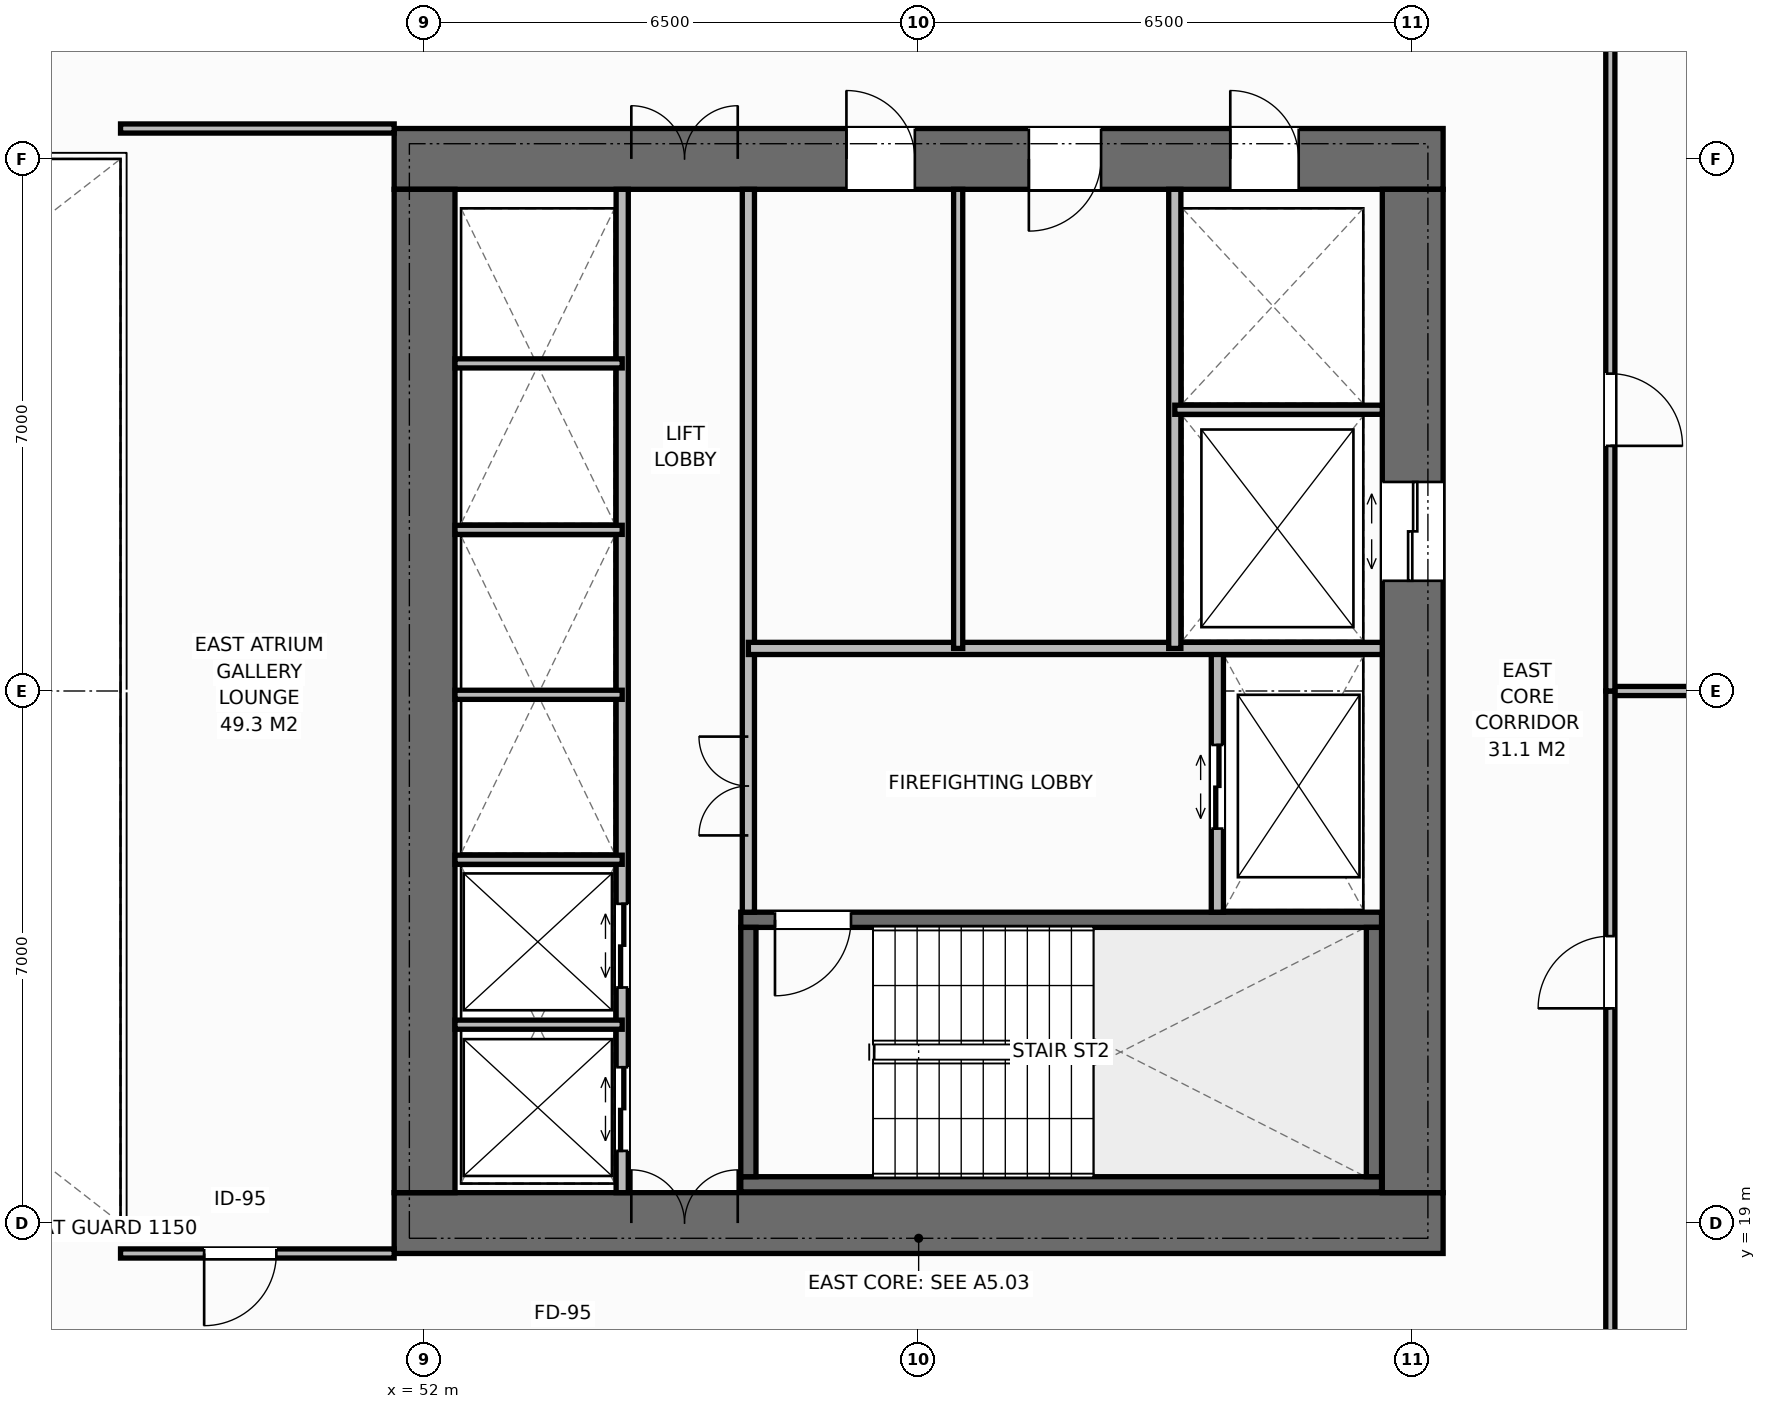
"""IFC4 building model, lengths in metres.
Left out: names, types, materials, properties, quantities, classifications, styles, units other than length and angle.
Written with IfcOpenShell. Run it as: python <this file> out.ifc"""

import sys

from ifc_helpers import new_model, si_unit, direction, frame, frame_2d, origin, place, context, subcontext, project, spatial, rectangle, extrude, element, fill, save


model = new_model("IFC4")
c1 = context("Model", 3, precision=1e-05, world=origin(), true_north=direction((0.0, 1.0)))
c2 = subcontext(c1, "Body", "Model", "MODEL_VIEW")
j1 = project(units=[si_unit("LENGTHUNIT", "METRE"), si_unit("PLANEANGLEUNIT", "RADIAN")], contexts=[c1])
p1 = place(None, origin())
s1 = spatial("IfcSite", under=j1, at=p1, CompositionType="ELEMENT")
p2 = place(p1, origin())
s2 = spatial("IfcBuilding", under=s1, at=p2, CompositionType="ELEMENT")
p3 = place(p2, frame((0.0, 0.0, 27.8)))
s3 = spatial("IfcBuildingStorey", under=s2, at=p3, CompositionType="ELEMENT", Elevation=27.8)
p4 = place(p3, frame((51.6, 19.0, 0.0), z_axis=(0.0, 0.0, 1.0), x_axis=(1.0, 0.0, 0.0)))
e1 = element("IfcWall", 1, at=p4, inside=s3, PredefinedType="SHEAR", context=c2, shape_type="SweptSolid", body=[
    extrude(rectangle(XDim=13.8, YDim=0.8, at=frame_2d((6.9, 0.0))), origin(), (0.0, 0.0, 1.0), 3.8),
])
p5 = place(p4, frame((3.12, 0.0, 0.0)))
e2 = element("IfcOpeningElement", 2, at=p5, cuts=e1, PredefinedType="OPENING", context=c2, shape_type="SweptSolid", body=[
    extrude(rectangle(XDim=1.4, YDim=2.2, at=frame_2d((0.7, 1.1))), frame((0.0, 0.41, 0.0), z_axis=(0.0, -1.0, 0.0), x_axis=(1.0, 0.0, 0.0)), (0.0, 0.0, 1.0), 0.82),
])
p6 = place(p3, frame((51.6, 33.0, 0.0), z_axis=(0.0, 0.0, 1.0), x_axis=(1.0, 0.0, 0.0)))
e3 = element("IfcWall", 3, at=p6, inside=s3, PredefinedType="SHEAR", context=c2, shape_type="SweptSolid", body=[
    extrude(rectangle(XDim=13.8, YDim=0.8, at=frame_2d((6.9, 0.0))), origin(), (0.0, 0.0, 1.0), 3.8),
])
p7 = place(p6, frame((3.12, 0.0, 0.0)))
e4 = element("IfcOpeningElement", 4, at=p7, cuts=e3, PredefinedType="OPENING", context=c2, shape_type="SweptSolid", body=[
    extrude(rectangle(XDim=1.4, YDim=2.2, at=frame_2d((0.7, 1.1))), frame((0.0, 0.41, 0.0), z_axis=(0.0, -1.0, 0.0), x_axis=(1.0, 0.0, 0.0)), (0.0, 0.0, 1.0), 0.82),
])
p8 = place(p6, frame((11.0, 0.0, 0.0)))
e5 = element("IfcOpeningElement", 5, at=p8, cuts=e3, PredefinedType="OPENING", context=c2, shape_type="SweptSolid", body=[
    extrude(rectangle(XDim=0.9, YDim=2.15, at=frame_2d((0.45, 1.075))), frame((0.0, 0.41, 0.0), z_axis=(0.0, -1.0, 0.0), x_axis=(1.0, 0.0, 0.0)), (0.0, 0.0, 1.0), 0.82),
])
p9 = place(p6, frame((5.95, 0.0, 0.0)))
e6 = element("IfcOpeningElement", 6, at=p9, cuts=e3, PredefinedType="OPENING", context=c2, shape_type="SweptSolid", body=[
    extrude(rectangle(XDim=0.9, YDim=2.15, at=frame_2d((0.45, 1.075))), frame((0.0, 0.41, 0.0), z_axis=(0.0, -1.0, 0.0), x_axis=(1.0, 0.0, 0.0)), (0.0, 0.0, 1.0), 0.82),
])
p10 = place(p6, frame((8.35, 0.0, 0.0)))
e7 = element("IfcOpeningElement", 7, at=p10, cuts=e3, PredefinedType="OPENING", context=c2, shape_type="SweptSolid", body=[
    extrude(rectangle(XDim=0.95, YDim=2.15, at=frame_2d((0.475, 1.075))), frame((0.0, 0.41, 0.0), z_axis=(0.0, -1.0, 0.0), x_axis=(1.0, 0.0, 0.0)), (0.0, 0.0, 1.0), 0.82),
])
p11 = place(p3, frame((52.0, 19.4, 0.0), z_axis=(0.0, 0.0, 1.0), x_axis=(0.0, 1.0, 0.0)))
e8 = element("IfcWall", 8, at=p11, inside=s3, PredefinedType="SHEAR", context=c2, shape_type="SweptSolid", body=[
    extrude(rectangle(XDim=13.2, YDim=0.8, at=frame_2d((6.6, 0.0))), origin(), (0.0, 0.0, 1.0), 3.8),
])
p12 = place(p3, frame((65.0, 19.4, 0.0), z_axis=(0.0, 0.0, 1.0), x_axis=(0.0, 1.0, 0.0)))
e9 = element("IfcWall", 9, at=p12, inside=s3, PredefinedType="SHEAR", context=c2, shape_type="SweptSolid", body=[
    extrude(rectangle(XDim=13.2, YDim=0.8, at=frame_2d((6.6, 0.0))), origin(), (0.0, 0.0, 1.0), 3.8),
])
p13 = place(p12, frame((8.05, 0.0, 0.0)))
e10 = element("IfcOpeningElement", 10, at=p13, cuts=e9, PredefinedType="OPENING", context=c2, shape_type="SweptSolid", body=[
    extrude(rectangle(XDim=1.3, YDim=2.2, at=frame_2d((0.65, 1.1))), frame((0.0, 0.41, 0.0), z_axis=(0.0, -1.0, 0.0), x_axis=(1.0, 0.0, 0.0)), (0.0, 0.0, 1.0), 0.82),
])
p14 = place(p3, frame((56.16, 19.51, 0.0), z_axis=(0.0, 0.0, 1.0), x_axis=(1.0, 0.0, 0.0)))
e11 = element("IfcWall", 11, at=p14, inside=s3, PredefinedType="SHEAR", context=c2, shape_type="SweptSolid", body=[
    extrude(rectangle(XDim=8.43, YDim=0.2, at=frame_2d((4.215, 0.0))), origin(), (0.0, 0.0, 1.0), 3.8),
])
p15 = place(p3, frame((56.16, 22.99, 0.0), z_axis=(0.0, 0.0, 1.0), x_axis=(1.0, 0.0, 0.0)))
e12 = element("IfcWall", 12, at=p15, inside=s3, PredefinedType="SHEAR", context=c2, shape_type="SweptSolid", body=[
    extrude(rectangle(XDim=8.43, YDim=0.2, at=frame_2d((4.215, 0.0))), origin(), (0.0, 0.0, 1.0), 3.8),
])
p16 = place(p15, frame((0.45, 0.0, 0.0)))
e13 = element("IfcOpeningElement", 13, at=p16, cuts=e12, PredefinedType="OPENING", context=c2, shape_type="SweptSolid", body=[
    extrude(rectangle(XDim=1.0, YDim=2.15, at=frame_2d((0.5, 1.075))), frame((0.0, 0.11, 0.0), z_axis=(0.0, -1.0, 0.0), x_axis=(1.0, 0.0, 0.0)), (0.0, 0.0, 1.0), 0.22),
])
for number, where, z_axis, x_axis in (
    (14, (56.26, 19.61, 0.0), (0.0, 0.0, 1.0), (0.0, 1.0, 0.0)),
    (15, (64.49, 19.61, 0.0), (0.0, 0.0, 1.0), (0.0, 1.0, 0.0)),
):
    element("IfcWall", number, at=place(p3, frame(where, z_axis=z_axis, x_axis=x_axis)), inside=s3, PredefinedType="SHEAR", context=c2, shape_type="SweptSolid", body=[
        extrude(rectangle(XDim=3.28, YDim=0.2, at=frame_2d((1.64, 0.0))), origin(), (0.0, 0.0, 1.0), 3.8),
    ])
p17 = place(p3, frame((54.6, 19.4, 0.0), z_axis=(0.0, 0.0, 1.0), x_axis=(0.0, 1.0, 0.0)))
e16 = element("IfcWall", 16, at=p17, inside=s3, PredefinedType="STANDARD", context=c2, shape_type="SweptSolid", body=[
    extrude(rectangle(XDim=13.2, YDim=0.16, at=frame_2d((6.6, 0.0))), origin(), (0.0, 0.0, 1.0), 3.55),
])
p18 = place(p17, frame((0.55, 0.0, 0.0)))
e17 = element("IfcOpeningElement", 17, at=p18, cuts=e16, PredefinedType="OPENING", context=c2, shape_type="SweptSolid", body=[
    extrude(rectangle(XDim=1.1, YDim=2.2, at=frame_2d((0.55, 1.1))), frame((0.0, 0.09, 0.0), z_axis=(0.0, -1.0, 0.0), x_axis=(1.0, 0.0, 0.0)), (0.0, 0.0, 1.0), 0.18),
])
p19 = place(p17, frame((2.7, 0.0, 0.0)))
e18 = element("IfcOpeningElement", 18, at=p19, cuts=e16, PredefinedType="OPENING", context=c2, shape_type="SweptSolid", body=[
    extrude(rectangle(XDim=1.1, YDim=2.2, at=frame_2d((0.55, 1.1))), frame((0.0, 0.09, 0.0), z_axis=(0.0, -1.0, 0.0), x_axis=(1.0, 0.0, 0.0)), (0.0, 0.0, 1.0), 0.18),
])
p20 = place(p3, frame((56.26, 23.09, 0.0), z_axis=(0.0, 0.0, 1.0), x_axis=(0.0, 1.0, 0.0)))
e19 = element("IfcWall", 19, at=p20, inside=s3, PredefinedType="STANDARD", context=c2, shape_type="SweptSolid", body=[
    extrude(rectangle(XDim=9.51, YDim=0.16, at=frame_2d((4.755, 0.0))), origin(), (0.0, 0.0, 1.0), 3.55),
])
p21 = place(p20, frame((1.01, 0.0, 0.0)))
e20 = element("IfcOpeningElement", 20, at=p21, cuts=e19, PredefinedType="OPENING", context=c2, shape_type="SweptSolid", body=[
    extrude(rectangle(XDim=1.3, YDim=2.2, at=frame_2d((0.65, 1.1))), frame((0.0, 0.09, 0.0), z_axis=(0.0, -1.0, 0.0), x_axis=(1.0, 0.0, 0.0)), (0.0, 0.0, 1.0), 0.18),
])
for number, where, z_axis, x_axis in (
    (21, (52.4, 21.61, 0.0), (0.0, 0.0, 1.0), (1.0, 0.0, 0.0)),
    (22, (52.4, 23.78, 0.0), (0.0, 0.0, 1.0), (1.0, 0.0, 0.0)),
    (23, (52.4, 25.95, 0.0), (0.0, 0.0, 1.0), (1.0, 0.0, 0.0)),
    (24, (52.4, 28.12, 0.0), (0.0, 0.0, 1.0), (1.0, 0.0, 0.0)),
    (25, (52.4, 30.31, 0.0), (0.0, 0.0, 1.0), (1.0, 0.0, 0.0)),
):
    element("IfcWall", number, at=place(p3, frame(where, z_axis=z_axis, x_axis=x_axis)), inside=s3, PredefinedType="PARTITIONING", context=c2, shape_type="SweptSolid", body=[
        extrude(rectangle(XDim=2.2, YDim=0.12, at=frame_2d((1.1, 0.0))), origin(), (0.0, 0.0, 1.0), 3.55),
    ])
p22 = place(p3, frame((62.43, 23.09, 0.0), z_axis=(0.0, 0.0, 1.0), x_axis=(0.0, 1.0, 0.0)))
e26 = element("IfcWall", 26, at=p22, inside=s3, PredefinedType="STANDARD", context=c2, shape_type="SweptSolid", body=[
    extrude(rectangle(XDim=3.47, YDim=0.16, at=frame_2d((1.735, 0.0))), origin(), (0.0, 0.0, 1.0), 3.55),
])
p23 = place(p22, frame((1.1, 0.0, 0.0)))
e27 = element("IfcOpeningElement", 27, at=p23, cuts=e26, PredefinedType="OPENING", context=c2, shape_type="SweptSolid", body=[
    extrude(rectangle(XDim=1.1, YDim=2.2, at=frame_2d((0.55, 1.1))), frame((0.0, 0.09, 0.0), z_axis=(0.0, -1.0, 0.0), x_axis=(1.0, 0.0, 0.0)), (0.0, 0.0, 1.0), 0.18),
])
p24 = place(p3, frame((56.26, 26.56, 0.0), z_axis=(0.0, 0.0, 1.0), x_axis=(1.0, 0.0, 0.0)))
e28 = element("IfcWall", 28, at=p24, inside=s3, PredefinedType="STANDARD", context=c2, shape_type="SweptSolid", body=[
    extrude(rectangle(XDim=8.34, YDim=0.16, at=frame_2d((4.17, 0.0))), origin(), (0.0, 0.0, 1.0), 3.55),
])
p25 = place(p3, frame((61.87, 26.56, 0.0), z_axis=(0.0, 0.0, 1.0), x_axis=(0.0, 1.0, 0.0)))
e29 = element("IfcWall", 29, at=p25, inside=s3, PredefinedType="STANDARD", context=c2, shape_type="SweptSolid", body=[
    extrude(rectangle(XDim=6.04, YDim=0.16, at=frame_2d((3.02, 0.0))), origin(), (0.0, 0.0, 1.0), 3.55),
])
p26 = place(p3, frame((61.87, 29.7, 0.0), z_axis=(0.0, 0.0, 1.0), x_axis=(1.0, 0.0, 0.0)))
e30 = element("IfcWall", 30, at=p26, inside=s3, PredefinedType="PARTITIONING", context=c2, shape_type="SweptSolid", body=[
    extrude(rectangle(XDim=2.73, YDim=0.12, at=frame_2d((1.365, 0.0))), origin(), (0.0, 0.0, 1.0), 3.55),
])
p27 = place(p3, frame((59.02, 26.56, 0.0), z_axis=(0.0, 0.0, 1.0), x_axis=(0.0, 1.0, 0.0)))
e31 = element("IfcWall", 31, at=p27, inside=s3, PredefinedType="PARTITIONING", context=c2, shape_type="SweptSolid", body=[
    extrude(rectangle(XDim=6.04, YDim=0.12, at=frame_2d((3.02, 0.0))), origin(), (0.0, 0.0, 1.0), 3.55),
])
p28 = place(p3, frame((48.0, 33.4, 0.0), z_axis=(0.0, 0.0, 1.0), x_axis=(1.0, 0.0, 0.0)))
e32 = element("IfcWall", 32, at=p28, inside=s3, PredefinedType="PARTITIONING", context=c2, shape_type="SweptSolid", body=[
    extrude(rectangle(XDim=3.6, YDim=0.12, at=frame_2d((1.8, 0.0))), origin(), (0.0, 0.0, 1.0), 3.55),
])
p29 = place(p3, frame((48.0, 18.6, 0.0), z_axis=(0.0, 0.0, 1.0), x_axis=(1.0, 0.0, 0.0)))
e33 = element("IfcWall", 33, at=p29, inside=s3, PredefinedType="PARTITIONING", context=c2, shape_type="SweptSolid", body=[
    extrude(rectangle(XDim=3.6, YDim=0.12, at=frame_2d((1.8, 0.0))), origin(), (0.0, 0.0, 1.0), 3.55),
])
p30 = place(p29, frame((1.1, 0.0, 0.0)))
e34 = element("IfcOpeningElement", 34, at=p30, cuts=e33, PredefinedType="OPENING", context=c2, shape_type="SweptSolid", body=[
    extrude(rectangle(XDim=0.95, YDim=2.15, at=frame_2d((0.475, 1.075))), frame((0.0, 0.07, 0.0), z_axis=(0.0, -1.0, 0.0), x_axis=(1.0, 0.0, 0.0)), (0.0, 0.0, 1.0), 0.14),
])
p31 = place(p3, frame((67.6, 26.0, 0.0), z_axis=(0.0, 0.0, 1.0), x_axis=(1.0, 0.0, 0.0)))
e35 = element("IfcWall", 35, at=p31, inside=s3, PredefinedType="PARTITIONING", context=c2, shape_type="SweptSolid", body=[
    extrude(rectangle(XDim=10.58, YDim=0.12, at=frame_2d((5.29, 0.0))), origin(), (0.0, 0.0, 1.0), 3.55),
])
p32 = place(p3, frame((67.6, 16.5, 0.0), z_axis=(0.0, 0.0, 1.0), x_axis=(0.0, 1.0, 0.0)))
e36 = element("IfcWall", 36, at=p32, inside=s3, PredefinedType="PARTITIONING", context=c2, shape_type="SweptSolid", body=[
    extrude(rectangle(XDim=9.5, YDim=0.12, at=frame_2d((4.75, 0.0))), origin(), (0.0, 0.0, 1.0), 3.55),
])
p33 = place(p32, frame((5.325, 0.0, 0.0)))
e37 = element("IfcOpeningElement", 37, at=p33, cuts=e36, PredefinedType="OPENING", context=c2, shape_type="SweptSolid", body=[
    extrude(rectangle(XDim=0.95, YDim=2.15, at=frame_2d((0.475, 1.075))), frame((0.0, 0.07, 0.0), z_axis=(0.0, -1.0, 0.0), x_axis=(1.0, 0.0, 0.0)), (0.0, 0.0, 1.0), 0.14),
])
p34 = place(p3, frame((67.6, 26.0, 0.0), z_axis=(0.0, 0.0, 1.0), x_axis=(0.0, 1.0, 0.0)))
e38 = element("IfcWall", 38, at=p34, inside=s3, PredefinedType="PARTITIONING", context=c2, shape_type="SweptSolid", body=[
    extrude(rectangle(XDim=9.5, YDim=0.12, at=frame_2d((4.75, 0.0))), origin(), (0.0, 0.0, 1.0), 3.55),
])
p35 = place(p34, frame((3.225, 0.0, 0.0)))
e39 = element("IfcOpeningElement", 39, at=p35, cuts=e38, PredefinedType="OPENING", context=c2, shape_type="SweptSolid", body=[
    extrude(rectangle(XDim=0.95, YDim=2.15, at=frame_2d((0.475, 1.075))), frame((0.0, 0.07, 0.0), z_axis=(0.0, -1.0, 0.0), x_axis=(1.0, 0.0, 0.0)), (0.0, 0.0, 1.0), 0.14),
])
p36 = place(p5, origin())
e40 = element("IfcDoor", 40, at=p36, inside=s3, OperationType="DOUBLE_DOOR_SINGLE_SWING", PredefinedType="DOOR", context=c2, shape_type="SweptSolid", body=[
    extrude(rectangle(XDim=1.4, YDim=2.2, at=frame_2d((0.7, 1.1))), frame((0.0, 0.125, 0.0), z_axis=(0.0, -1.0, 0.0), x_axis=(1.0, 0.0, 0.0)), (0.0, 0.0, 1.0), 0.05),
])
fill(e2, e40)
p37 = place(p7, origin())
e41 = element("IfcDoor", 41, at=p37, inside=s3, OperationType="DOUBLE_DOOR_SINGLE_SWING", PredefinedType="DOOR", context=c2, shape_type="SweptSolid", body=[
    extrude(rectangle(XDim=1.4, YDim=2.2, at=frame_2d((0.7, 1.1))), frame((0.0, -0.075, 0.0), z_axis=(0.0, -1.0, 0.0), x_axis=(1.0, 0.0, 0.0)), (0.0, 0.0, 1.0), 0.05),
])
fill(e4, e41)
p38 = place(p18, origin())
e42 = element("IfcDoor", 42, at=p38, inside=s3, OperationType="DOUBLE_DOOR_SLIDING", PredefinedType="DOOR", context=c2, shape_type="SweptSolid", body=[
    extrude(rectangle(XDim=1.1, YDim=2.2, at=frame_2d((0.55, 1.1))), frame((0.0, 0.025, 0.0), z_axis=(0.0, -1.0, 0.0), x_axis=(1.0, 0.0, 0.0)), (0.0, 0.0, 1.0), 0.05),
])
fill(e17, e42)
p39 = place(p19, origin())
e43 = element("IfcDoor", 43, at=p39, inside=s3, OperationType="DOUBLE_DOOR_SLIDING", PredefinedType="DOOR", context=c2, shape_type="SweptSolid", body=[
    extrude(rectangle(XDim=1.1, YDim=2.2, at=frame_2d((0.55, 1.1))), frame((0.0, 0.025, 0.0), z_axis=(0.0, -1.0, 0.0), x_axis=(1.0, 0.0, 0.0)), (0.0, 0.0, 1.0), 0.05),
])
fill(e18, e43)
p40 = place(p16, origin())
e44 = element("IfcDoor", 44, at=p40, inside=s3, OperationType="SINGLE_SWING_RIGHT", PredefinedType="DOOR", context=c2, shape_type="SweptSolid", body=[
    extrude(rectangle(XDim=1.0, YDim=2.15, at=frame_2d((0.5, 1.075))), frame((0.0, 0.025, 0.0), z_axis=(0.0, -1.0, 0.0), x_axis=(1.0, 0.0, 0.0)), (0.0, 0.0, 1.0), 0.05),
])
fill(e13, e44)
p41 = place(p23, origin())
e45 = element("IfcDoor", 45, at=p41, inside=s3, OperationType="DOUBLE_DOOR_SLIDING", PredefinedType="DOOR", context=c2, shape_type="SweptSolid", body=[
    extrude(rectangle(XDim=1.1, YDim=2.2, at=frame_2d((0.55, 1.1))), frame((0.0, 0.025, 0.0), z_axis=(0.0, -1.0, 0.0), x_axis=(1.0, 0.0, 0.0)), (0.0, 0.0, 1.0), 0.05),
])
fill(e27, e45)
p42 = place(p21, origin())
e46 = element("IfcDoor", 46, at=p42, inside=s3, OperationType="DOUBLE_DOOR_SINGLE_SWING", PredefinedType="DOOR", context=c2, shape_type="SweptSolid", body=[
    extrude(rectangle(XDim=1.3, YDim=2.2, at=frame_2d((0.65, 1.1))), frame((0.0, 0.025, 0.0), z_axis=(0.0, -1.0, 0.0), x_axis=(1.0, 0.0, 0.0)), (0.0, 0.0, 1.0), 0.05),
])
fill(e20, e46)
p43 = place(p13, origin())
e47 = element("IfcDoor", 47, at=p43, inside=s3, OperationType="DOUBLE_DOOR_SLIDING", PredefinedType="DOOR", context=c2, shape_type="SweptSolid", body=[
    extrude(rectangle(XDim=1.3, YDim=2.2, at=frame_2d((0.65, 1.1))), frame((0.0, 0.025, 0.0), z_axis=(0.0, -1.0, 0.0), x_axis=(1.0, 0.0, 0.0)), (0.0, 0.0, 1.0), 0.05),
])
fill(e10, e47)
p44 = place(p8, origin())
e48 = element("IfcDoor", 48, at=p44, inside=s3, OperationType="SINGLE_SWING_LEFT", PredefinedType="DOOR", context=c2, shape_type="SweptSolid", body=[
    extrude(rectangle(XDim=0.9, YDim=2.15, at=frame_2d((0.45, 1.075))), frame((0.0, -0.075, 0.0), z_axis=(0.0, -1.0, 0.0), x_axis=(1.0, 0.0, 0.0)), (0.0, 0.0, 1.0), 0.05),
])
fill(e5, e48)
p45 = place(p9, origin())
e49 = element("IfcDoor", 49, at=p45, inside=s3, OperationType="SINGLE_SWING_LEFT", PredefinedType="DOOR", context=c2, shape_type="SweptSolid", body=[
    extrude(rectangle(XDim=0.9, YDim=2.15, at=frame_2d((0.45, 1.075))), frame((0.0, -0.075, 0.0), z_axis=(0.0, -1.0, 0.0), x_axis=(1.0, 0.0, 0.0)), (0.0, 0.0, 1.0), 0.05),
])
fill(e6, e49)
p46 = place(p10, origin())
e50 = element("IfcDoor", 50, at=p46, inside=s3, OperationType="SINGLE_SWING_RIGHT", PredefinedType="DOOR", context=c2, shape_type="SweptSolid", body=[
    extrude(rectangle(XDim=0.95, YDim=2.15, at=frame_2d((0.475, 1.075))), frame((0.0, -0.075, 0.0), z_axis=(0.0, -1.0, 0.0), x_axis=(1.0, 0.0, 0.0)), (0.0, 0.0, 1.0), 0.05),
])
fill(e7, e50)
p47 = place(p30, origin())
e51 = element("IfcDoor", 51, at=p47, inside=s3, OperationType="SINGLE_SWING_RIGHT", PredefinedType="DOOR", context=c2, shape_type="SweptSolid", body=[
    extrude(rectangle(XDim=0.95, YDim=2.15, at=frame_2d((0.475, 1.075))), frame((0.0, 0.025, 0.0), z_axis=(0.0, -1.0, 0.0), x_axis=(1.0, 0.0, 0.0)), (0.0, 0.0, 1.0), 0.05),
])
fill(e34, e51)
p48 = place(p33, origin())
e52 = element("IfcDoor", 52, at=p48, inside=s3, OperationType="SINGLE_SWING_LEFT", PredefinedType="DOOR", context=c2, shape_type="SweptSolid", body=[
    extrude(rectangle(XDim=0.95, YDim=2.15, at=frame_2d((0.475, 1.075))), frame((0.0, 0.025, 0.0), z_axis=(0.0, -1.0, 0.0), x_axis=(1.0, 0.0, 0.0)), (0.0, 0.0, 1.0), 0.05),
])
fill(e37, e52)
p49 = place(p35, origin())
e53 = element("IfcDoor", 53, at=p49, inside=s3, OperationType="SINGLE_SWING_RIGHT", PredefinedType="DOOR", context=c2, shape_type="SweptSolid", body=[
    extrude(rectangle(XDim=0.95, YDim=2.15, at=frame_2d((0.475, 1.075))), frame((0.0, 0.025, 0.0), z_axis=(0.0, -1.0, 0.0), x_axis=(1.0, 0.0, 0.0)), (0.0, 0.0, 1.0), 0.05),
])
fill(e39, e53)
save(model, sys.argv[1])
